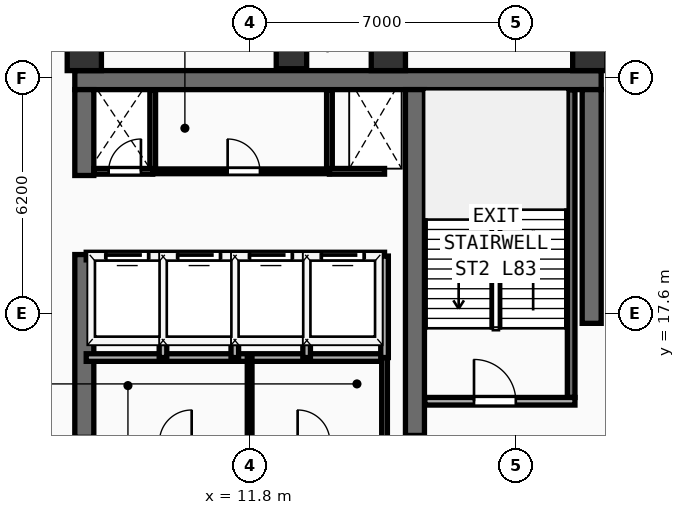
"""IFC4 building model, lengths in metres.
Left out: names, types, materials, properties, quantities, classifications, styles, units other than length and angle.
Written with IfcOpenShell. Run it as: python <this file> out.ifc"""

import sys

from ifc_helpers import new_model, si_unit, direction, frame, frame_2d, origin, origin_2d, place, context, subcontext, project, spatial, rectangle, extrude, element, fill, save


model = new_model("IFC4")
c1 = context("Model", 3, precision=1e-05, world=origin(), true_north=direction((0.0, 1.0)))
c2 = subcontext(c1, "Body", "Model", "MODEL_VIEW")
j1 = project(units=[si_unit("LENGTHUNIT", "METRE"), si_unit("PLANEANGLEUNIT", "RADIAN")], contexts=[c1])
p1 = place(None, origin())
s1 = spatial("IfcSite", under=j1, at=p1, CompositionType="ELEMENT")
p2 = place(p1, origin())
s2 = spatial("IfcBuilding", under=s1, at=p2, CompositionType="ELEMENT")
p3 = place(p2, frame((0.0, 0.0, 323.6)))
s3 = spatial("IfcBuildingStorey", under=s2, at=p3, CompositionType="ELEMENT", Elevation=323.6)
p4 = place(p3, frame((7.2, 23.75, 0.0), z_axis=(0.0, 0.0, 1.0), x_axis=(1.0, 0.0, 0.0)))
e1 = element("IfcWall", 1, at=p4, inside=s3, PredefinedType="SHEAR", context=c2, shape_type="SweptSolid", body=[
    extrude(rectangle(XDim=13.85, YDim=0.5, at=frame_2d((6.925, 0.0))), origin(), (0.0, 0.0, 1.0), 3.56),
])
p5 = place(p3, frame((7.45, 14.35, 0.0), z_axis=(0.0, 0.0, 1.0), x_axis=(0.0, 1.0, 0.0)))
e2 = element("IfcWall", 2, at=p5, inside=s3, PredefinedType="SHEAR", context=c2, shape_type="SweptSolid", body=[
    extrude(rectangle(XDim=4.81, YDim=0.5, at=frame_2d((2.405, 0.0))), origin(), (0.0, 0.0, 1.0), 3.56),
])
p6 = place(p3, frame((7.45, 21.24, 0.0), z_axis=(0.0, 0.0, 1.0), x_axis=(0.0, 1.0, 0.0)))
e3 = element("IfcWall", 3, at=p6, inside=s3, PredefinedType="SHEAR", context=c2, shape_type="SweptSolid", body=[
    extrude(rectangle(XDim=2.26, YDim=0.5, at=frame_2d((1.13, 0.0))), origin(), (0.0, 0.0, 1.0), 3.56),
])
p7 = place(p3, frame((20.8, 17.35, 0.0), z_axis=(0.0, 0.0, 1.0), x_axis=(0.0, 1.0, 0.0)))
e4 = element("IfcWall", 4, at=p7, inside=s3, PredefinedType="SHEAR", context=c2, shape_type="SweptSolid", body=[
    extrude(rectangle(XDim=6.15, YDim=0.5, at=frame_2d((3.075, 0.0))), origin(), (0.0, 0.0, 1.0), 3.56),
])
p8 = place(p3, frame((16.15, 14.4, 0.0), z_axis=(0.0, 0.0, 1.0), x_axis=(0.0, 1.0, 0.0)))
e5 = element("IfcWall", 5, at=p8, inside=s3, PredefinedType="SHEAR", context=c2, shape_type="SweptSolid", body=[
    extrude(rectangle(XDim=9.1, YDim=0.5, at=frame_2d((4.55, 0.0))), origin(), (0.0, 0.0, 1.0), 3.56),
])
for number, where, z_axis, x_axis in (
    (6, (7.45, 24.45, 0.0), (0.0, 0.0, 1.0), (1.0, 0.0, 0.0)),
    (7, (15.45, 24.45, 0.0), (0.0, 0.0, 1.0), (1.0, 0.0, 0.0)),
    (8, (20.75, 24.45, 0.0), (0.0, 0.0, 1.0), (1.0, 0.0, 0.0)),
):
    element("IfcColumn", number, at=place(p3, frame(where, z_axis=z_axis, x_axis=x_axis)), inside=s3, PredefinedType="COLUMN", context=c2, shape_type="SweptSolid", body=[
        extrude(rectangle(XDim=0.9, YDim=0.9, at=origin_2d()), origin(), (0.0, 0.0, 1.0), 3.56),
    ])
p9 = place(p3, frame((12.9, 24.45, 0.0), z_axis=(0.0, 0.0, 1.0), x_axis=(1.0, 0.0, 0.0)))
e9 = element("IfcColumn", 9, at=p9, inside=s3, PredefinedType="COLUMN", context=c2, shape_type="SweptSolid", body=[
    extrude(rectangle(XDim=0.8, YDim=0.8, at=origin_2d()), origin(), (0.0, 0.0, 1.0), 3.56),
])
p10 = place(p3, frame((27.517, 19.607, 0.0), z_axis=(0.0, 0.0, 1.0), x_axis=(-0.707106781187, 0.707106781187, 0.0)))
e10 = element("IfcWall", 10, at=p10, inside=s3, PredefinedType="SOLIDWALL", context=c2, shape_type="SweptSolid", body=[
    extrude(rectangle(XDim=9.207, YDim=0.28, at=frame_2d((4.603, 0.0))), origin(), (0.0, 0.0, 1.0), 3.56),
])
p11 = place(p3, frame((20.26, 15.4, 0.0), z_axis=(0.0, 0.0, 1.0), x_axis=(0.0, 1.0, 0.0)))
e11 = element("IfcWall", 11, at=p11, inside=s3, PredefinedType="SHEAR", context=c2, shape_type="SweptSolid", body=[
    extrude(rectangle(XDim=8.09, YDim=0.2, at=frame_2d((4.045, 0.0))), origin(), (0.0, 0.0, 1.0), 3.56),
])
p12 = place(p3, frame((16.41, 15.3, 0.0), z_axis=(0.0, 0.0, 1.0), x_axis=(1.0, 0.0, 0.0)))
e12 = element("IfcWall", 12, at=p12, inside=s3, PredefinedType="PARTITIONING", context=c2, shape_type="SweptSolid", body=[
    extrude(rectangle(XDim=3.95, YDim=0.2, at=frame_2d((1.975, 0.0))), origin(), (0.0, 0.0, 1.0), 3.56),
])
p13 = place(p12, frame((1.294, 0.0, 0.0)))
e13 = element("IfcOpeningElement", 13, at=p13, cuts=e12, PredefinedType="OPENING", context=c2, shape_type="SweptSolid", body=[
    extrude(rectangle(XDim=1.1, YDim=2.2, at=frame_2d((0.55, 1.1))), frame((0.0, 0.11, 0.0), z_axis=(0.0, -1.0, 0.0), x_axis=(1.0, 0.0, 0.0)), (0.0, 0.0, 1.0), 0.22),
])
p14 = place(p3, frame((7.5, 16.45, 0.0), z_axis=(0.0, 0.0, 1.0), x_axis=(1.0, 0.0, 0.0)))
e14 = element("IfcWall", 14, at=p14, inside=s3, PredefinedType="PARTITIONING", context=c2, shape_type="SweptSolid", body=[
    extrude(rectangle(XDim=7.85, YDim=0.2, at=frame_2d((3.925, 0.0))), origin(), (0.0, 0.0, 1.0), 3.56),
])
p15 = place(p3, frame((15.35, 14.22, 0.0), z_axis=(0.0, 0.0, 1.0), x_axis=(0.0, 1.0, 0.0)))
e15 = element("IfcWall", 15, at=p15, inside=s3, PredefinedType="PARTITIONING", context=c2, shape_type="SweptSolid", body=[
    extrude(rectangle(XDim=2.23, YDim=0.15, at=frame_2d((1.115, 0.0))), origin(), (0.0, 0.0, 1.0), 3.56),
])
p16 = place(p3, frame((11.8, 14.22, 0.0), z_axis=(0.0, 0.0, 1.0), x_axis=(0.0, 1.0, 0.0)))
e16 = element("IfcWall", 16, at=p16, inside=s3, PredefinedType="PARTITIONING", context=c2, shape_type="SweptSolid", body=[
    extrude(rectangle(XDim=2.23, YDim=0.125, at=frame_2d((1.115, 0.0))), origin(), (0.0, 0.0, 1.0), 3.56),
])
p17 = place(p3, frame((7.5, 19.12, 0.0), z_axis=(0.0, 0.0, 1.0), x_axis=(1.0, 0.0, 0.0)))
e17 = element("IfcWall", 17, at=p17, inside=s3, PredefinedType="PARTITIONING", context=c2, shape_type="SweptSolid", body=[
    extrude(rectangle(XDim=7.85, YDim=0.2, at=frame_2d((3.925, 0.0))), origin(), (0.0, 0.0, 1.0), 3.56),
])
p18 = place(p17, frame((0.53, 0.0, 0.0)))
e18 = element("IfcOpeningElement", 18, at=p18, cuts=e17, PredefinedType="OPENING", context=c2, shape_type="SweptSolid", body=[
    extrude(rectangle(XDim=1.1, YDim=2.2, at=frame_2d((0.55, 1.1))), frame((0.0, 0.11, 0.0), z_axis=(0.0, -1.0, 0.0), x_axis=(1.0, 0.0, 0.0)), (0.0, 0.0, 1.0), 0.22),
])
p19 = place(p17, frame((2.42, 0.0, 0.0)))
e19 = element("IfcOpeningElement", 19, at=p19, cuts=e17, PredefinedType="OPENING", context=c2, shape_type="SweptSolid", body=[
    extrude(rectangle(XDim=1.1, YDim=2.2, at=frame_2d((0.55, 1.1))), frame((0.0, 0.11, 0.0), z_axis=(0.0, -1.0, 0.0), x_axis=(1.0, 0.0, 0.0)), (0.0, 0.0, 1.0), 0.22),
])
p20 = place(p17, frame((4.31, 0.0, 0.0)))
e20 = element("IfcOpeningElement", 20, at=p20, cuts=e17, PredefinedType="OPENING", context=c2, shape_type="SweptSolid", body=[
    extrude(rectangle(XDim=1.1, YDim=2.2, at=frame_2d((0.55, 1.1))), frame((0.0, 0.11, 0.0), z_axis=(0.0, -1.0, 0.0), x_axis=(1.0, 0.0, 0.0)), (0.0, 0.0, 1.0), 0.22),
])
p21 = place(p17, frame((6.2, 0.0, 0.0)))
e21 = element("IfcOpeningElement", 21, at=p21, cuts=e17, PredefinedType="OPENING", context=c2, shape_type="SweptSolid", body=[
    extrude(rectangle(XDim=1.1, YDim=2.2, at=frame_2d((0.55, 1.1))), frame((0.0, 0.11, 0.0), z_axis=(0.0, -1.0, 0.0), x_axis=(1.0, 0.0, 0.0)), (0.0, 0.0, 1.0), 0.22),
])
for number, where, z_axis, x_axis in (
    (22, (15.35, 16.45, 0.0), (0.0, 0.0, 1.0), (0.0, 1.0, 0.0)),
    (23, (9.52, 16.45, 0.0), (0.0, 0.0, 1.0), (0.0, 1.0, 0.0)),
    (24, (11.41, 16.45, 0.0), (0.0, 0.0, 1.0), (0.0, 1.0, 0.0)),
    (25, (13.3, 16.45, 0.0), (0.0, 0.0, 1.0), (0.0, 1.0, 0.0)),
):
    element("IfcWall", number, at=place(p3, frame(where, z_axis=z_axis, x_axis=x_axis)), inside=s3, PredefinedType="PARTITIONING", context=c2, shape_type="SweptSolid", body=[
        extrude(rectangle(XDim=2.67, YDim=0.2, at=frame_2d((1.335, 0.0))), origin(), (0.0, 0.0, 1.0), 3.56),
    ])
for number, where, z_axis, x_axis in (
    (26, (9.25, 21.35, 0.0), (0.0, 0.0, 1.0), (0.0, 1.0, 0.0)),
    (27, (13.9, 21.35, 0.0), (0.0, 0.0, 1.0), (0.0, 1.0, 0.0)),
):
    element("IfcWall", number, at=place(p3, frame(where, z_axis=z_axis, x_axis=x_axis)), inside=s3, PredefinedType="PARTITIONING", context=c2, shape_type="SweptSolid", body=[
        extrude(rectangle(XDim=2.13, YDim=0.15, at=frame_2d((1.065, 0.0))), origin(), (0.0, 0.0, 1.0), 3.56),
    ])
p22 = place(p3, frame((7.7, 21.35, 0.0), z_axis=(0.0, 0.0, 1.0), x_axis=(1.0, 0.0, 0.0)))
e28 = element("IfcWall", 28, at=p22, inside=s3, PredefinedType="PARTITIONING", context=c2, shape_type="SweptSolid", body=[
    extrude(rectangle(XDim=1.55, YDim=0.15, at=frame_2d((0.775, 0.0))), origin(), (0.0, 0.0, 1.0), 3.56),
])
p23 = place(p22, frame((0.39, 0.0, 0.0)))
e29 = element("IfcOpeningElement", 29, at=p23, cuts=e28, PredefinedType="OPENING", context=c2, shape_type="SweptSolid", body=[
    extrude(rectangle(XDim=0.85, YDim=2.15, at=frame_2d((0.425, 1.075))), frame((0.0, 0.085, 0.0), z_axis=(0.0, -1.0, 0.0), x_axis=(1.0, 0.0, 0.0)), (0.0, 0.0, 1.0), 0.17),
])
p24 = place(p3, frame((13.9, 21.35, 0.0), z_axis=(0.0, 0.0, 1.0), x_axis=(1.0, 0.0, 0.0)))
e30 = element("IfcWall", 30, at=p24, inside=s3, PredefinedType="PARTITIONING", context=c2, shape_type="SweptSolid", body=[
    extrude(rectangle(XDim=1.45, YDim=0.15, at=frame_2d((0.725, 0.0))), origin(), (0.0, 0.0, 1.0), 3.56),
])
p25 = place(p3, frame((9.25, 21.35, 0.0), z_axis=(0.0, 0.0, 1.0), x_axis=(1.0, 0.0, 0.0)))
e31 = element("IfcWall", 31, at=p25, inside=s3, PredefinedType="PARTITIONING", context=c2, shape_type="SweptSolid", body=[
    extrude(rectangle(XDim=4.65, YDim=0.125, at=frame_2d((2.325, 0.0))), origin(), (0.0, 0.0, 1.0), 3.56),
])
p26 = place(p25, frame((1.971, 0.0, 0.0)))
e32 = element("IfcOpeningElement", 32, at=p26, cuts=e31, PredefinedType="OPENING", context=c2, shape_type="SweptSolid", body=[
    extrude(rectangle(XDim=0.85, YDim=2.15, at=frame_2d((0.425, 1.075))), frame((0.0, 0.073, 0.0), z_axis=(0.0, -1.0, 0.0), x_axis=(1.0, 0.0, 0.0)), (0.0, 0.0, 1.0), 0.145),
])
p27 = place(p13, origin())
e33 = element("IfcDoor", 33, at=p27, inside=s3, OperationType="SINGLE_SWING_LEFT", PredefinedType="DOOR", context=c2, shape_type="SweptSolid", body=[
    extrude(rectangle(XDim=1.1, YDim=2.2, at=frame_2d((0.55, 1.1))), frame((0.0, 0.025, 0.0), z_axis=(0.0, -1.0, 0.0), x_axis=(1.0, 0.0, 0.0)), (0.0, 0.0, 1.0), 0.05),
])
fill(e13, e33)
p28 = place(p18, origin())
e34 = element("IfcDoor", 34, at=p28, inside=s3, OperationType="SLIDING_TO_LEFT", PredefinedType="DOOR", context=c2, shape_type="SweptSolid", body=[
    extrude(rectangle(XDim=1.1, YDim=2.2, at=frame_2d((0.55, 1.1))), frame((0.0, 0.025, 0.0), z_axis=(0.0, -1.0, 0.0), x_axis=(1.0, 0.0, 0.0)), (0.0, 0.0, 1.0), 0.05),
])
fill(e18, e34)
p29 = place(p19, origin())
e35 = element("IfcDoor", 35, at=p29, inside=s3, OperationType="SLIDING_TO_LEFT", PredefinedType="DOOR", context=c2, shape_type="SweptSolid", body=[
    extrude(rectangle(XDim=1.1, YDim=2.2, at=frame_2d((0.55, 1.1))), frame((0.0, 0.025, 0.0), z_axis=(0.0, -1.0, 0.0), x_axis=(1.0, 0.0, 0.0)), (0.0, 0.0, 1.0), 0.05),
])
fill(e19, e35)
p30 = place(p20, origin())
e36 = element("IfcDoor", 36, at=p30, inside=s3, OperationType="SLIDING_TO_LEFT", PredefinedType="DOOR", context=c2, shape_type="SweptSolid", body=[
    extrude(rectangle(XDim=1.1, YDim=2.2, at=frame_2d((0.55, 1.1))), frame((0.0, 0.025, 0.0), z_axis=(0.0, -1.0, 0.0), x_axis=(1.0, 0.0, 0.0)), (0.0, 0.0, 1.0), 0.05),
])
fill(e20, e36)
p31 = place(p21, origin())
e37 = element("IfcDoor", 37, at=p31, inside=s3, OperationType="SLIDING_TO_LEFT", PredefinedType="DOOR", context=c2, shape_type="SweptSolid", body=[
    extrude(rectangle(XDim=1.1, YDim=2.2, at=frame_2d((0.55, 1.1))), frame((0.0, 0.025, 0.0), z_axis=(0.0, -1.0, 0.0), x_axis=(1.0, 0.0, 0.0)), (0.0, 0.0, 1.0), 0.05),
])
fill(e21, e37)
p32 = place(p23, origin())
e38 = element("IfcDoor", 38, at=p32, inside=s3, OperationType="SINGLE_SWING_RIGHT", PredefinedType="DOOR", context=c2, shape_type="SweptSolid", body=[
    extrude(rectangle(XDim=0.85, YDim=2.15, at=frame_2d((0.425, 1.075))), frame((0.0, 0.025, 0.0), z_axis=(0.0, -1.0, 0.0), x_axis=(1.0, 0.0, 0.0)), (0.0, 0.0, 1.0), 0.05),
])
fill(e29, e38)
p33 = place(p26, origin())
e39 = element("IfcDoor", 39, at=p33, inside=s3, OperationType="SINGLE_SWING_LEFT", PredefinedType="DOOR", context=c2, shape_type="SweptSolid", body=[
    extrude(rectangle(XDim=0.85, YDim=2.15, at=frame_2d((0.425, 1.075))), frame((0.0, 0.025, 0.0), z_axis=(0.0, -1.0, 0.0), x_axis=(1.0, 0.0, 0.0)), (0.0, 0.0, 1.0), 0.05),
])
fill(e32, e39)
save(model, sys.argv[1])
